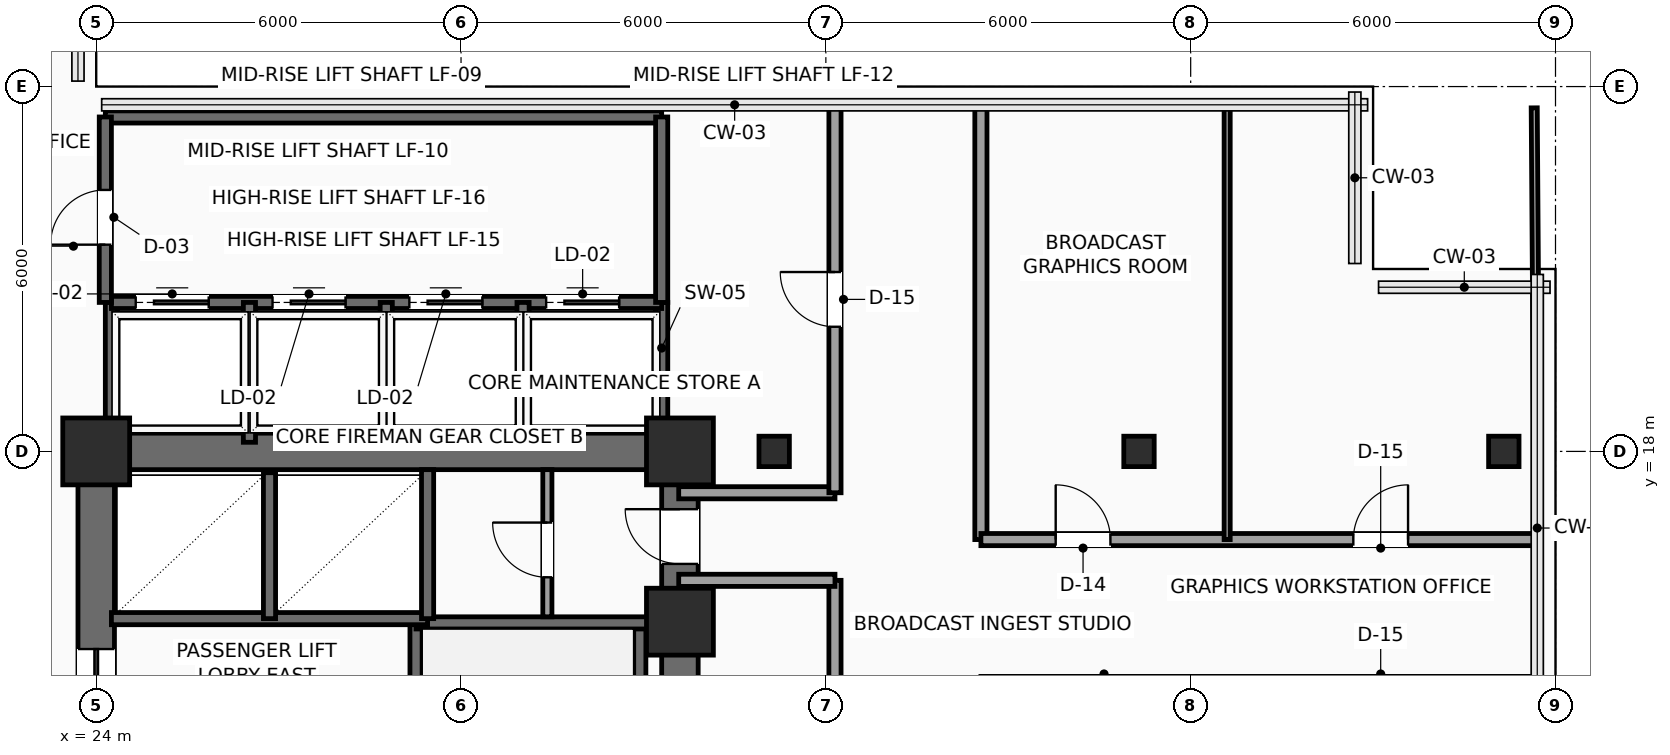
"""IFC4 building model, lengths in metres.
Left out: names, types, materials, properties, quantities, classifications, styles, units other than length and angle.
Written with IfcOpenShell. Run it as: python <this file> out.ifc"""

import sys

from ifc_helpers import new_model, si_unit, direction, frame, frame_2d, origin, origin_2d, place, context, subcontext, project, spatial, rectangle, hollow_rectangle, extrude, element, fill, save


model = new_model("IFC4")
c1 = context("Model", 3, precision=1e-05, world=origin(), true_north=direction((0.0, 1.0)))
c2 = subcontext(c1, "Body", "Model", "MODEL_VIEW")
j1 = project(units=[si_unit("LENGTHUNIT", "METRE"), si_unit("PLANEANGLEUNIT", "RADIAN")], contexts=[c1])
p1 = place(None, origin())
s1 = spatial("IfcSite", under=j1, at=p1, CompositionType="ELEMENT")
p2 = place(p1, origin())
s2 = spatial("IfcBuilding", under=s1, at=p2, CompositionType="ELEMENT")
p3 = place(p2, frame((0.0, 0.0, 145.65)))
s3 = spatial("IfcBuildingStorey", under=s2, at=p3, CompositionType="ELEMENT", Elevation=145.65)
for number, where, z_axis, x_axis in (
    (1, (24.0, 18.0, 0.0), (0.0, 0.0, 1.0), (1.0, 0.0, 0.0)),
    (2, (33.6, 15.2, 0.0), (0.0, 0.0, 1.0), (1.0, 0.0, 0.0)),
    (3, (33.6, 18.0, 0.0), (0.0, 0.0, 1.0), (1.0, 0.0, 0.0)),
):
    element("IfcColumn", number, at=place(p3, frame(where, z_axis=z_axis, x_axis=x_axis)), inside=s3, PredefinedType="COLUMN", context=c2, shape_type="SweptSolid", body=[
        extrude(rectangle(XDim=1.1, YDim=1.1, at=origin_2d()), origin(), (0.0, 0.0, 1.0), 3.75),
    ])
for number, where, z_axis, x_axis in (
    (4, (35.15, 18.0, 0.0), (0.0, 0.0, 1.0), (1.0, 0.0, 0.0)),
    (5, (41.15, 18.0, 0.0), (0.0, 0.0, 1.0), (1.0, 0.0, 0.0)),
    (6, (47.15, 18.0, 0.0), (0.0, 0.0, 1.0), (1.0, 0.0, 0.0)),
):
    element("IfcColumn", number, at=place(p3, frame(where, z_axis=z_axis, x_axis=x_axis)), inside=s3, PredefinedType="COLUMN", context=c2, shape_type="SweptSolid", body=[
        extrude(hollow_rectangle(XDim=0.5, YDim=0.5, WallThickness=0.025, InnerFilletRadius=0.025, OuterFilletRadius=0.04, at=origin_2d()), origin(), (0.0, 0.0, 1.0), 3.75),
    ])
p4 = place(p3, frame((24.0, 18.0, 0.0), z_axis=(0.0, 0.0, 1.0), x_axis=(1.0, 0.0, 0.0)))
e7 = element("IfcWall", 7, at=p4, inside=s3, PredefinedType="SHEAR", context=c2, shape_type="SweptSolid", body=[
    extrude(rectangle(XDim=9.6, YDim=0.6, at=frame_2d((4.8, 0.0))), origin(), (0.0, 0.0, 1.0), 3.525),
])
p5 = place(p3, frame((24.0, 6.0, 0.0), z_axis=(0.0, 0.0, 1.0), x_axis=(0.0, 1.0, 0.0)))
e8 = element("IfcWall", 8, at=p5, inside=s3, PredefinedType="SHEAR", context=c2, shape_type="SweptSolid", body=[
    extrude(rectangle(XDim=12.0, YDim=0.6, at=frame_2d((6.0, 0.0))), origin(), (0.0, 0.0, 1.0), 3.525),
])
p6 = place(p5, frame((7.15, 0.0, 0.0)))
e9 = element("IfcOpeningElement", 9, at=p6, cuts=e8, PredefinedType="OPENING", context=c2, shape_type="SweptSolid", body=[
    extrude(rectangle(XDim=1.6, YDim=2.3, at=frame_2d((0.8, 1.15))), frame((0.0, 0.31, 0.0), z_axis=(0.0, -1.0, 0.0), x_axis=(1.0, 0.0, 0.0)), (0.0, 0.0, 1.0), 0.62),
])
p7 = place(p3, frame((33.6, 6.0, 0.0), z_axis=(0.0, 0.0, 1.0), x_axis=(0.0, 1.0, 0.0)))
e10 = element("IfcWall", 10, at=p7, inside=s3, PredefinedType="SHEAR", context=c2, shape_type="SweptSolid", body=[
    extrude(rectangle(XDim=12.0, YDim=0.6, at=frame_2d((6.0, 0.0))), origin(), (0.0, 0.0, 1.0), 3.525),
])
p8 = place(p7, frame((10.15, 0.0, 0.0)))
e11 = element("IfcOpeningElement", 11, at=p8, cuts=e10, PredefinedType="OPENING", context=c2, shape_type="SweptSolid", body=[
    extrude(rectangle(XDim=0.9, YDim=2.15, at=frame_2d((0.45, 1.075))), frame((0.0, 0.31, 0.0), z_axis=(0.0, -1.0, 0.0), x_axis=(1.0, 0.0, 0.0)), (0.0, 0.0, 1.0), 0.62),
])
p9 = place(p3, frame((29.26, 6.3, 0.0), z_axis=(0.0, 0.0, 1.0), x_axis=(0.0, 1.0, 0.0)))
e12 = element("IfcWall", 12, at=p9, inside=s3, PredefinedType="SHEAR", context=c2, shape_type="SweptSolid", body=[
    extrude(rectangle(XDim=8.88, YDim=0.2, at=frame_2d((4.44, 0.0))), origin(), (0.0, 0.0, 1.0), 3.525),
])
p10 = place(p9, frame((0.35, 0.0, 0.0)))
e13 = element("IfcOpeningElement", 13, at=p10, cuts=e12, PredefinedType="OPENING", context=c2, shape_type="SweptSolid", body=[
    extrude(rectangle(XDim=1.1, YDim=2.2, at=frame_2d((0.55, 1.1))), frame((0.0, 0.11, 0.0), z_axis=(0.0, -1.0, 0.0), x_axis=(1.0, 0.0, 0.0)), (0.0, 0.0, 1.0), 0.22),
])
p11 = place(p3, frame((32.94, 6.3, 0.0), z_axis=(0.0, 0.0, 1.0), x_axis=(0.0, 1.0, 0.0)))
e14 = element("IfcWall", 14, at=p11, inside=s3, PredefinedType="SHEAR", context=c2, shape_type="SweptSolid", body=[
    extrude(rectangle(XDim=8.88, YDim=0.2, at=frame_2d((4.44, 0.0))), origin(), (0.0, 0.0, 1.0), 3.525),
])
p12 = place(p3, frame((29.26, 15.18, 0.0), z_axis=(0.0, 0.0, 1.0), x_axis=(1.0, 0.0, 0.0)))
e15 = element("IfcWall", 15, at=p12, inside=s3, PredefinedType="SHEAR", context=c2, shape_type="SweptSolid", body=[
    extrude(rectangle(XDim=4.04, YDim=0.2, at=frame_2d((2.02, 0.0))), origin(), (0.0, 0.0, 1.0), 3.525),
])
p13 = place(p3, frame((24.25, 15.25, 0.0), z_axis=(0.0, 0.0, 1.0), x_axis=(1.0, 0.0, 0.0)))
e16 = element("IfcWall", 16, at=p13, inside=s3, PredefinedType="SHEAR", context=c2, shape_type="SweptSolid", body=[
    extrude(rectangle(XDim=5.2, YDim=0.2, at=frame_2d((2.6, 0.0))), origin(), (0.0, 0.0, 1.0), 3.525),
])
p14 = place(p3, frame((26.85, 15.25, 0.0), z_axis=(0.0, 0.0, 1.0), x_axis=(0.0, 1.0, 0.0)))
e17 = element("IfcWall", 17, at=p14, inside=s3, PredefinedType="SHEAR", context=c2, shape_type="SweptSolid", body=[
    extrude(rectangle(XDim=2.4, YDim=0.2, at=frame_2d((1.2, 0.0))), origin(), (0.0, 0.0, 1.0), 3.525),
])
p15 = place(p3, frame((29.45, 15.25, 0.0), z_axis=(0.0, 0.0, 1.0), x_axis=(0.0, 1.0, 0.0)))
e18 = element("IfcWall", 18, at=p15, inside=s3, PredefinedType="SHEAR", context=c2, shape_type="SweptSolid", body=[
    extrude(rectangle(XDim=2.45, YDim=0.2, at=frame_2d((1.225, 0.0))), origin(), (0.0, 0.0, 1.0), 3.525),
])
p16 = place(p3, frame((31.42, 15.28, 0.0), z_axis=(0.0, 0.0, 1.0), x_axis=(0.0, 1.0, 0.0)))
e19 = element("IfcWall", 19, at=p16, inside=s3, PredefinedType="PARTITIONING", context=c2, shape_type="SweptSolid", body=[
    extrude(rectangle(XDim=2.42, YDim=0.15, at=frame_2d((1.21, 0.0))), origin(), (0.0, 0.0, 1.0), 3.525),
])
p17 = place(p16, frame((0.65, 0.0, 0.0)))
e20 = element("IfcOpeningElement", 20, at=p17, cuts=e19, PredefinedType="OPENING", context=c2, shape_type="SweptSolid", body=[
    extrude(rectangle(XDim=0.9, YDim=2.15, at=frame_2d((0.45, 1.075))), frame((0.0, 0.085, 0.0), z_axis=(0.0, -1.0, 0.0), x_axis=(1.0, 0.0, 0.0)), (0.0, 0.0, 1.0), 0.17),
])
for number, where, z_axis, x_axis in (
    (21, (33.3, 18.1, 0.0), (0.0, 0.0, 1.0), (0.0, 1.0, 0.0)),
    (22, (24.25, 18.1, 0.0), (0.0, 0.0, 1.0), (0.0, 1.0, 0.0)),
):
    element("IfcWall", number, at=place(p3, frame(where, z_axis=z_axis, x_axis=x_axis)), inside=s3, PredefinedType="SHEAR", context=c2, shape_type="SweptSolid", body=[
        extrude(rectangle(XDim=2.35, YDim=0.2, at=frame_2d((1.175, 0.0))), origin(), (0.0, 0.0, 1.0), 3.525),
    ])
p18 = place(p3, frame((24.25, 20.45, 0.0), z_axis=(0.0, 0.0, 1.0), x_axis=(1.0, 0.0, 0.0)))
e23 = element("IfcWall", 23, at=p18, inside=s3, PredefinedType="SHEAR", context=c2, shape_type="SweptSolid", body=[
    extrude(rectangle(XDim=9.05, YDim=0.2, at=frame_2d((4.525, 0.0))), origin(), (0.0, 0.0, 1.0), 3.525),
])
p19 = place(p18, frame((0.4, 0.0, 0.0)))
e24 = element("IfcOpeningElement", 24, at=p19, cuts=e23, PredefinedType="OPENING", context=c2, shape_type="SweptSolid", body=[
    extrude(rectangle(XDim=1.2, YDim=2.2, at=frame_2d((0.6, 1.1))), frame((0.0, 0.11, 0.0), z_axis=(0.0, -1.0, 0.0), x_axis=(1.0, 0.0, 0.0)), (0.0, 0.0, 1.0), 0.22),
])
p20 = place(p18, frame((2.65, 0.0, 0.0)))
e25 = element("IfcOpeningElement", 25, at=p20, cuts=e23, PredefinedType="OPENING", context=c2, shape_type="SweptSolid", body=[
    extrude(rectangle(XDim=1.2, YDim=2.2, at=frame_2d((0.6, 1.1))), frame((0.0, 0.11, 0.0), z_axis=(0.0, -1.0, 0.0), x_axis=(1.0, 0.0, 0.0)), (0.0, 0.0, 1.0), 0.22),
])
p21 = place(p18, frame((4.9, 0.0, 0.0)))
e26 = element("IfcOpeningElement", 26, at=p21, cuts=e23, PredefinedType="OPENING", context=c2, shape_type="SweptSolid", body=[
    extrude(rectangle(XDim=1.2, YDim=2.2, at=frame_2d((0.6, 1.1))), frame((0.0, 0.11, 0.0), z_axis=(0.0, -1.0, 0.0), x_axis=(1.0, 0.0, 0.0)), (0.0, 0.0, 1.0), 0.22),
])
p22 = place(p18, frame((7.15, 0.0, 0.0)))
e27 = element("IfcOpeningElement", 27, at=p22, cuts=e23, PredefinedType="OPENING", context=c2, shape_type="SweptSolid", body=[
    extrude(rectangle(XDim=1.2, YDim=2.2, at=frame_2d((0.6, 1.1))), frame((0.0, 0.11, 0.0), z_axis=(0.0, -1.0, 0.0), x_axis=(1.0, 0.0, 0.0)), (0.0, 0.0, 1.0), 0.22),
])
for number, where, z_axis, x_axis in (
    (28, (26.52, 18.15, 0.0), (0.0, 0.0, 1.0), (0.0, 1.0, 0.0)),
    (29, (28.77, 18.15, 0.0), (0.0, 0.0, 1.0), (0.0, 1.0, 0.0)),
    (30, (31.02, 18.15, 0.0), (0.0, 0.0, 1.0), (0.0, 1.0, 0.0)),
):
    element("IfcWall", number, at=place(p3, frame(where, z_axis=z_axis, x_axis=x_axis)), inside=s3, PredefinedType="SHEAR", context=c2, shape_type="SweptSolid", body=[
        extrude(rectangle(XDim=2.3, YDim=0.2, at=frame_2d((1.15, 0.0))), origin(), (0.0, 0.0, 1.0), 3.525),
    ])
p23 = place(p3, frame((24.15, 23.5, 0.0), z_axis=(0.0, 0.0, 1.0), x_axis=(1.0, 0.0, 0.0)))
e31 = element("IfcWall", 31, at=p23, inside=s3, PredefinedType="SHEAR", context=c2, shape_type="SweptSolid", body=[
    extrude(rectangle(XDim=9.15, YDim=0.2, at=frame_2d((4.575, 0.0))), origin(), (0.0, 0.0, 1.0), 3.525),
])
p24 = place(p3, frame((33.3, 20.45, 0.0), z_axis=(0.0, 0.0, 1.0), x_axis=(0.0, 1.0, 0.0)))
e32 = element("IfcWall", 32, at=p24, inside=s3, PredefinedType="SHEAR", context=c2, shape_type="SweptSolid", body=[
    extrude(rectangle(XDim=3.05, YDim=0.2, at=frame_2d((1.525, 0.0))), origin(), (0.0, 0.0, 1.0), 3.525),
])
p25 = place(p3, frame((24.15, 20.45, 0.0), z_axis=(0.0, 0.0, 1.0), x_axis=(0.0, 1.0, 0.0)))
e33 = element("IfcWall", 33, at=p25, inside=s3, PredefinedType="SHEAR", context=c2, shape_type="SweptSolid", body=[
    extrude(rectangle(XDim=3.05, YDim=0.2, at=frame_2d((1.525, 0.0))), origin(), (0.0, 0.0, 1.0), 3.525),
])
p26 = place(p25, frame((0.95, 0.0, 0.0)))
e34 = element("IfcOpeningElement", 34, at=p26, cuts=e33, PredefinedType="OPENING", context=c2, shape_type="SweptSolid", body=[
    extrude(rectangle(XDim=0.9, YDim=2.15, at=frame_2d((0.45, 1.075))), frame((0.0, 0.11, 0.0), z_axis=(0.0, -1.0, 0.0), x_axis=(1.0, 0.0, 0.0)), (0.0, 0.0, 1.0), 0.22),
])
p27 = place(p3, frame((36.15, 5.8, 0.0), z_axis=(0.0, 0.0, 1.0), x_axis=(0.0, 1.0, 0.0)))
e35 = element("IfcWall", 35, at=p27, inside=s3, PredefinedType="PARTITIONING", context=c2, shape_type="SweptSolid", body=[
    extrude(rectangle(XDim=10.08, YDim=0.2, at=frame_2d((5.04, 0.0))), origin(), (0.0, 0.0, 1.0), 3.525),
])
p28 = place(p27, frame((2.05, 0.0, 0.0)))
e36 = element("IfcOpeningElement", 36, at=p28, cuts=e35, PredefinedType="OPENING", context=c2, shape_type="SweptSolid", body=[
    extrude(rectangle(XDim=0.9, YDim=2.1, at=frame_2d((0.45, 1.05))), frame((0.0, 0.11, 0.0), z_axis=(0.0, -1.0, 0.0), x_axis=(1.0, 0.0, 0.0)), (0.0, 0.0, 1.0), 0.22),
])
p29 = place(p27, frame((7.09, 0.0, 0.0)))
e37 = element("IfcOpeningElement", 37, at=p29, cuts=e35, PredefinedType="OPENING", context=c2, shape_type="SweptSolid", body=[
    extrude(rectangle(XDim=0.9, YDim=2.1, at=frame_2d((0.45, 1.05))), frame((0.0, 0.11, 0.0), z_axis=(0.0, -1.0, 0.0), x_axis=(1.0, 0.0, 0.0)), (0.0, 0.0, 1.0), 0.22),
])
for number, where, z_axis, x_axis in (
    (38, (36.15, 15.88, 0.0), (0.0, 0.0, 1.0), (-1.0, 0.0, 0.0)),
    (39, (33.58, 17.32, 0.0), (0.0, 0.0, 1.0), (1.0, 0.0, 0.0)),
):
    element("IfcWall", number, at=place(p3, frame(where, z_axis=z_axis, x_axis=x_axis)), inside=s3, PredefinedType="PARTITIONING", context=c2, shape_type="SweptSolid", body=[
        extrude(rectangle(XDim=2.57, YDim=0.2, at=frame_2d((1.285, 0.0))), origin(), (0.0, 0.0, 1.0), 3.525),
    ])
p30 = place(p3, frame((36.15, 17.32, 0.0), z_axis=(0.0, 0.0, 1.0), x_axis=(0.0, 1.0, 0.0)))
e40 = element("IfcWall", 40, at=p30, inside=s3, PredefinedType="PARTITIONING", context=c2, shape_type="SweptSolid", body=[
    extrude(rectangle(XDim=6.38, YDim=0.2, at=frame_2d((3.19, 0.0))), origin(), (0.0, 0.0, 1.0), 3.525),
])
p31 = place(p30, frame((2.73, 0.0, 0.0)))
e41 = element("IfcOpeningElement", 41, at=p31, cuts=e40, PredefinedType="OPENING", context=c2, shape_type="SweptSolid", body=[
    extrude(rectangle(XDim=0.9, YDim=2.1, at=frame_2d((0.45, 1.05))), frame((0.0, 0.11, 0.0), z_axis=(0.0, -1.0, 0.0), x_axis=(1.0, 0.0, 0.0)), (0.0, 0.0, 1.0), 0.22),
])
p32 = place(p3, frame((38.55, 23.7, 0.0), z_axis=(0.0, 0.0, 1.0), x_axis=(0.0, -1.0, 0.0)))
e42 = element("IfcWall", 42, at=p32, inside=s3, PredefinedType="PARTITIONING", context=c2, shape_type="SweptSolid", body=[
    extrude(rectangle(XDim=7.15, YDim=0.2, at=frame_2d((3.575, 0.0))), origin(), (0.0, 0.0, 1.0), 3.525),
])
p33 = place(p3, frame((38.55, 16.55, 0.0), z_axis=(0.0, 0.0, 1.0), x_axis=(1.0, 0.0, 0.0)))
e43 = element("IfcWall", 43, at=p33, inside=s3, PredefinedType="PARTITIONING", context=c2, shape_type="SweptSolid", body=[
    extrude(rectangle(XDim=9.15, YDim=0.2, at=frame_2d((4.575, 0.0))), origin(), (0.0, 0.0, 1.0), 3.525),
])
p34 = place(p33, frame((1.23, 0.0, 0.0)))
e44 = element("IfcOpeningElement", 44, at=p34, cuts=e43, PredefinedType="OPENING", context=c2, shape_type="SweptSolid", body=[
    extrude(rectangle(XDim=0.9, YDim=2.1, at=frame_2d((0.45, 1.05))), frame((0.0, 0.11, 0.0), z_axis=(0.0, -1.0, 0.0), x_axis=(1.0, 0.0, 0.0)), (0.0, 0.0, 1.0), 0.22),
])
p35 = place(p33, frame((6.125, 0.0, 0.0)))
e45 = element("IfcOpeningElement", 45, at=p35, cuts=e43, PredefinedType="OPENING", context=c2, shape_type="SweptSolid", body=[
    extrude(rectangle(XDim=0.9, YDim=2.1, at=frame_2d((0.45, 1.05))), frame((0.0, 0.11, 0.0), z_axis=(0.0, -1.0, 0.0), x_axis=(1.0, 0.0, 0.0)), (0.0, 0.0, 1.0), 0.22),
])
p36 = place(p3, frame((42.6, 16.55, 0.0), z_axis=(0.0, 0.0, 1.0), x_axis=(0.0, 1.0, 0.0)))
e46 = element("IfcWall", 46, at=p36, inside=s3, PredefinedType="PARTITIONING", context=c2, shape_type="SweptSolid", body=[
    extrude(rectangle(XDim=7.15, YDim=0.1, at=frame_2d((3.575, 0.0))), origin(), (0.0, 0.0, 1.0), 3.525),
])
p37 = place(p3, frame((47.7, 16.55, 0.0), z_axis=(0.0, 0.0, 1.0), x_axis=(-0.007049101019, 0.999975154779, 0.0)))
e47 = element("IfcWall", 47, at=p37, inside=s3, PredefinedType="PARTITIONING", context=c2, shape_type="SweptSolid", body=[
    extrude(rectangle(XDim=7.1, YDim=0.1, at=frame_2d((3.55, 0.0))), origin(), (0.0, 0.0, 1.0), 3.525),
])
p38 = place(p6, origin())
e48 = element("IfcDoor", 48, at=p38, inside=s3, OperationType="DOUBLE_DOOR_SLIDING", PredefinedType="DOOR", context=c2, shape_type="SweptSolid", body=[
    extrude(rectangle(XDim=1.6, YDim=2.3, at=frame_2d((0.8, 1.15))), frame((0.0, 0.025, 0.0), z_axis=(0.0, -1.0, 0.0), x_axis=(1.0, 0.0, 0.0)), (0.0, 0.0, 1.0), 0.05),
])
fill(e9, e48)
p39 = place(p8, origin())
e49 = element("IfcDoor", 49, at=p39, inside=s3, OperationType="SINGLE_SWING_RIGHT", PredefinedType="DOOR", context=c2, shape_type="SweptSolid", body=[
    extrude(rectangle(XDim=0.9, YDim=2.15, at=frame_2d((0.45, 1.075))), frame((0.0, 0.025, 0.0), z_axis=(0.0, -1.0, 0.0), x_axis=(1.0, 0.0, 0.0)), (0.0, 0.0, 1.0), 0.05),
])
fill(e11, e49)
p40 = place(p17, origin())
e50 = element("IfcDoor", 50, at=p40, inside=s3, OperationType="SINGLE_SWING_RIGHT", PredefinedType="DOOR", context=c2, shape_type="SweptSolid", body=[
    extrude(rectangle(XDim=0.9, YDim=2.15, at=frame_2d((0.45, 1.075))), frame((0.0, 0.025, 0.0), z_axis=(0.0, -1.0, 0.0), x_axis=(1.0, 0.0, 0.0)), (0.0, 0.0, 1.0), 0.05),
])
fill(e20, e50)
p41 = place(p19, origin())
e51 = element("IfcDoor", 51, at=p41, inside=s3, OperationType="SLIDING_TO_RIGHT", PredefinedType="DOOR", context=c2, shape_type="SweptSolid", body=[
    extrude(rectangle(XDim=1.2, YDim=2.2, at=frame_2d((0.6, 1.1))), frame((0.0, 0.025, 0.0), z_axis=(0.0, -1.0, 0.0), x_axis=(1.0, 0.0, 0.0)), (0.0, 0.0, 1.0), 0.05),
])
fill(e24, e51)
p42 = place(p20, origin())
e52 = element("IfcDoor", 52, at=p42, inside=s3, OperationType="SLIDING_TO_RIGHT", PredefinedType="DOOR", context=c2, shape_type="SweptSolid", body=[
    extrude(rectangle(XDim=1.2, YDim=2.2, at=frame_2d((0.6, 1.1))), frame((0.0, 0.025, 0.0), z_axis=(0.0, -1.0, 0.0), x_axis=(1.0, 0.0, 0.0)), (0.0, 0.0, 1.0), 0.05),
])
fill(e25, e52)
p43 = place(p21, origin())
e53 = element("IfcDoor", 53, at=p43, inside=s3, OperationType="SLIDING_TO_RIGHT", PredefinedType="DOOR", context=c2, shape_type="SweptSolid", body=[
    extrude(rectangle(XDim=1.2, YDim=2.2, at=frame_2d((0.6, 1.1))), frame((0.0, 0.025, 0.0), z_axis=(0.0, -1.0, 0.0), x_axis=(1.0, 0.0, 0.0)), (0.0, 0.0, 1.0), 0.05),
])
fill(e26, e53)
p44 = place(p22, origin())
e54 = element("IfcDoor", 54, at=p44, inside=s3, OperationType="SLIDING_TO_RIGHT", PredefinedType="DOOR", context=c2, shape_type="SweptSolid", body=[
    extrude(rectangle(XDim=1.2, YDim=2.2, at=frame_2d((0.6, 1.1))), frame((0.0, 0.025, 0.0), z_axis=(0.0, -1.0, 0.0), x_axis=(1.0, 0.0, 0.0)), (0.0, 0.0, 1.0), 0.05),
])
fill(e27, e54)
p45 = place(p26, origin())
e55 = element("IfcDoor", 55, at=p45, inside=s3, OperationType="SINGLE_SWING_LEFT", PredefinedType="DOOR", context=c2, shape_type="SweptSolid", body=[
    extrude(rectangle(XDim=0.9, YDim=2.15, at=frame_2d((0.45, 1.075))), frame((0.0, 0.025, 0.0), z_axis=(0.0, -1.0, 0.0), x_axis=(1.0, 0.0, 0.0)), (0.0, 0.0, 1.0), 0.05),
])
fill(e34, e55)
p46 = place(p31, origin())
e56 = element("IfcDoor", 56, at=p46, inside=s3, OperationType="SINGLE_SWING_RIGHT", PredefinedType="DOOR", context=c2, shape_type="SweptSolid", body=[
    extrude(rectangle(XDim=0.9, YDim=2.1, at=frame_2d((0.45, 1.05))), frame((0.0, 0.025, 0.0), z_axis=(0.0, -1.0, 0.0), x_axis=(1.0, 0.0, 0.0)), (0.0, 0.0, 1.0), 0.05),
])
fill(e41, e56)
p47 = place(p34, origin())
e57 = element("IfcDoor", 57, at=p47, inside=s3, OperationType="SINGLE_SWING_LEFT", PredefinedType="DOOR", context=c2, shape_type="SweptSolid", body=[
    extrude(rectangle(XDim=0.9, YDim=2.1, at=frame_2d((0.45, 1.05))), frame((0.0, 0.025, 0.0), z_axis=(0.0, -1.0, 0.0), x_axis=(1.0, 0.0, 0.0)), (0.0, 0.0, 1.0), 0.05),
])
fill(e44, e57)
p48 = place(p35, origin())
e58 = element("IfcDoor", 58, at=p48, inside=s3, OperationType="SINGLE_SWING_RIGHT", PredefinedType="DOOR", context=c2, shape_type="SweptSolid", body=[
    extrude(rectangle(XDim=0.9, YDim=2.1, at=frame_2d((0.45, 1.05))), frame((0.0, 0.025, 0.0), z_axis=(0.0, -1.0, 0.0), x_axis=(1.0, 0.0, 0.0)), (0.0, 0.0, 1.0), 0.05),
])
fill(e45, e58)
save(model, sys.argv[1])
